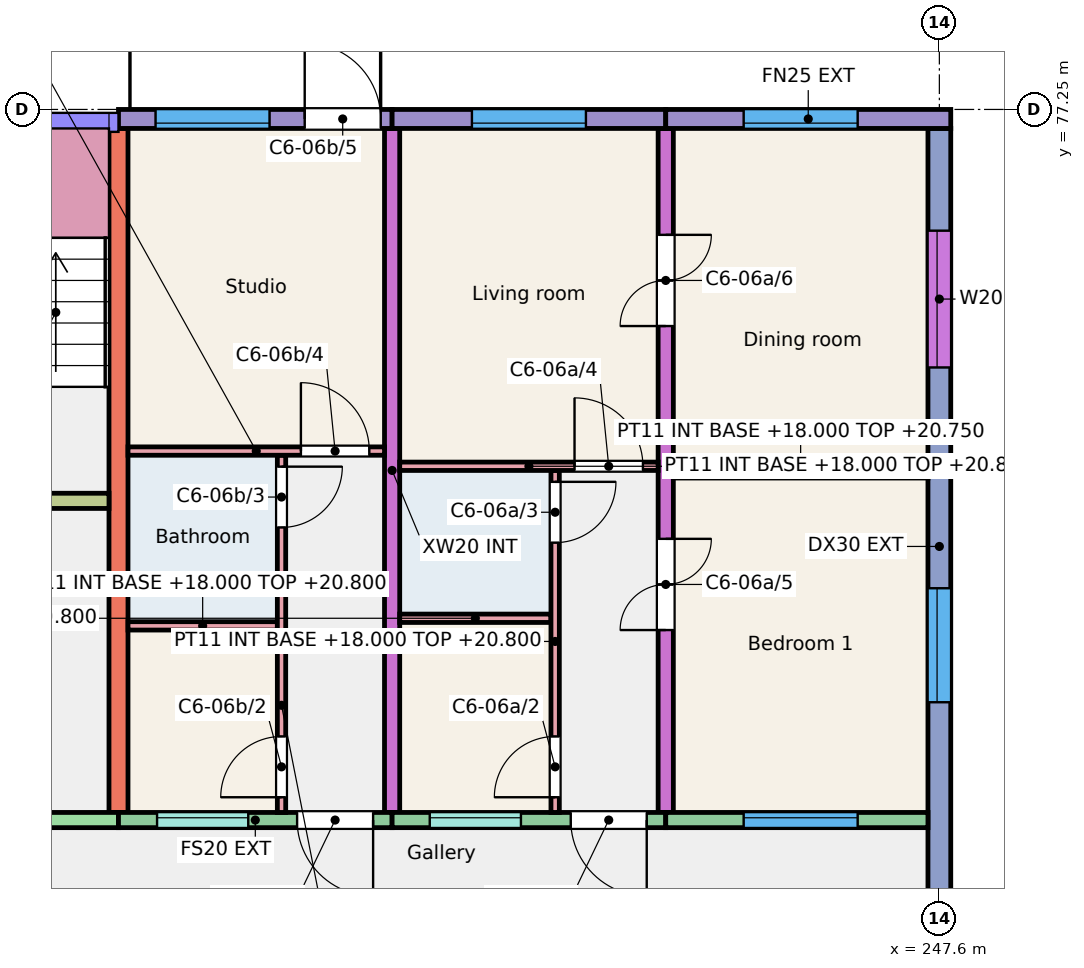
"""IFC4 building model, lengths in metres.
Left out: names, types, materials, properties, quantities, classifications, styles, units other than length and angle.
Written with IfcOpenShell. Run it as: python <this file> out.ifc"""

import sys

from ifc_helpers import new_model, si_unit, direction, frame, frame_2d, origin, place, context, subcontext, project, spatial, rectangle, extrude, element, fill, save


model = new_model("IFC4")
c1 = context("Model", 3, precision=1e-05, world=origin(), true_north=direction((0.0, 1.0)))
c2 = subcontext(c1, "Body", "Model", "MODEL_VIEW")
j1 = project(units=[si_unit("LENGTHUNIT", "METRE"), si_unit("PLANEANGLEUNIT", "RADIAN")], contexts=[c1])
p1 = place(None, origin())
s1 = spatial("IfcSite", under=j1, at=p1, CompositionType="ELEMENT")
p2 = place(p1, origin())
s2 = spatial("IfcBuilding", under=s1, at=p2, CompositionType="ELEMENT")
p3 = place(p2, frame((0.0, 0.0, 18.0)))
s3 = spatial("IfcBuildingStorey", under=s2, at=p3, CompositionType="ELEMENT", Elevation=18.0)
p4 = place(p3, frame((236.8, 68.0, 0.0), z_axis=(0.0, 0.0, 1.0), x_axis=(0.0, 1.0, 0.0)))
e1 = element("IfcWall", 1, at=p4, inside=s3, PredefinedType="SHEAR", context=c2, shape_type="SweptSolid", body=[
    extrude(rectangle(XDim=9.0, YDim=0.25, at=frame_2d((4.5, 0.0))), origin(), (0.0, 0.0, 1.0), 3.0),
])
p5 = place(p3, frame((240.4, 68.0, 0.0), z_axis=(0.0, 0.0, 1.0), x_axis=(0.0, 1.0, 0.0)))
e2 = element("IfcWall", 2, at=p5, inside=s3, PredefinedType="SHEAR", context=c2, shape_type="SweptSolid", body=[
    extrude(rectangle(XDim=9.0, YDim=0.2, at=frame_2d((4.5, 0.0))), origin(), (0.0, 0.0, 1.0), 3.0),
])
p6 = place(p3, frame((244.0, 68.0, 0.0), z_axis=(0.0, 0.0, 1.0), x_axis=(0.0, 1.0, 0.0)))
e3 = element("IfcWall", 3, at=p6, inside=s3, PredefinedType="SHEAR", context=c2, shape_type="SweptSolid", body=[
    extrude(rectangle(XDim=9.0, YDim=0.2, at=frame_2d((4.5, 0.0))), origin(), (0.0, 0.0, 1.0), 3.0),
])
p7 = place(p6, frame((2.4, 0.0, 0.0)))
e4 = element("IfcOpeningElement", 4, at=p7, cuts=e3, PredefinedType="OPENING", context=c2, shape_type="SweptSolid", body=[
    extrude(rectangle(XDim=1.2, YDim=2.1, at=frame_2d((0.6, 1.05))), frame((0.0, 0.11, 0.0), z_axis=(0.0, -1.0, 0.0), x_axis=(1.0, 0.0, 0.0)), (0.0, 0.0, 1.0), 0.22),
])
p8 = place(p6, frame((6.4, 0.0, 0.0)))
e5 = element("IfcOpeningElement", 5, at=p8, cuts=e3, PredefinedType="OPENING", context=c2, shape_type="SweptSolid", body=[
    extrude(rectangle(XDim=1.2, YDim=2.1, at=frame_2d((0.6, 1.05))), frame((0.0, 0.11, 0.0), z_axis=(0.0, -1.0, 0.0), x_axis=(1.0, 0.0, 0.0)), (0.0, 0.0, 1.0), 0.22),
])
p9 = place(p3, frame((247.6, 66.0, 0.0), z_axis=(0.0, 0.0, 1.0), x_axis=(0.0, 1.0, 0.0)))
e6 = element("IfcWall", 6, at=p9, inside=s3, PredefinedType="SHEAR", context=c2, shape_type="SweptSolid", body=[
    extrude(rectangle(XDim=11.0, YDim=0.3, at=frame_2d((5.5, 0.0))), origin(), (0.0, 0.0, 1.0), 3.0),
])
p10 = place(p9, frame((3.45, 0.0, 0.9)))
e7 = element("IfcOpeningElement", 7, at=p10, cuts=e6, PredefinedType="OPENING", context=c2, shape_type="SweptSolid", body=[
    extrude(rectangle(XDim=1.5, YDim=1.5, at=frame_2d((0.75, 0.75))), frame((0.0, 0.16, 0.0), z_axis=(0.0, -1.0, 0.0), x_axis=(1.0, 0.0, 0.0)), (0.0, 0.0, 1.0), 0.32),
])
p11 = place(p9, frame((7.855, 0.0, 0.9)))
e8 = element("IfcOpeningElement", 8, at=p11, cuts=e6, PredefinedType="OPENING", context=c2, shape_type="SweptSolid", body=[
    extrude(rectangle(XDim=1.8, YDim=1.5, at=frame_2d((0.9, 0.75))), frame((0.0, 0.16, 0.0), z_axis=(0.0, -1.0, 0.0), x_axis=(1.0, 0.0, 0.0)), (0.0, 0.0, 1.0), 0.32),
])
p12 = place(p3, frame((230.95, 67.9, 0.0), z_axis=(0.0, 0.0, 1.0), x_axis=(1.0, 0.0, 0.0)))
e9 = element("IfcWall", 9, at=p12, inside=s3, PredefinedType="SHEAR", context=c2, shape_type="SweptSolid", body=[
    extrude(rectangle(XDim=5.85, YDim=0.2, at=frame_2d((2.925, 0.0))), origin(), (0.0, 0.0, 1.0), 3.0),
])
p13 = place(p12, frame((2.312, 0.0, 0.0)))
e10 = element("IfcOpeningElement", 10, at=p13, cuts=e9, PredefinedType="OPENING", context=c2, shape_type="SweptSolid", body=[
    extrude(rectangle(XDim=1.1, YDim=2.1, at=frame_2d((0.55, 1.05))), frame((0.0, 0.11, 0.0), z_axis=(0.0, -1.0, 0.0), x_axis=(1.0, 0.0, 0.0)), (0.0, 0.0, 1.0), 0.22),
])
p14 = place(p3, frame((230.95, 72.1, 0.0), z_axis=(0.0, 0.0, 1.0), x_axis=(1.0, 0.0, 0.0)))
e11 = element("IfcWall", 11, at=p14, inside=s3, PredefinedType="SHEAR", context=c2, shape_type="SweptSolid", body=[
    extrude(rectangle(XDim=5.725, YDim=0.2, at=frame_2d((2.863, 0.0))), origin(), (0.0, 0.0, 1.0), 3.0),
])
p15 = place(p14, frame((3.775, 0.0, 0.0)))
e12 = element("IfcOpeningElement", 12, at=p15, cuts=e11, PredefinedType="OPENING", context=c2, shape_type="SweptSolid", body=[
    extrude(rectangle(XDim=1.0, YDim=2.1, at=frame_2d((0.5, 1.05))), frame((0.0, 0.11, 0.0), z_axis=(0.0, -1.0, 0.0), x_axis=(1.0, 0.0, 0.0)), (0.0, 0.0, 1.0), 0.22),
])
p16 = place(p14, frame((0.762, 0.0, 0.0)))
e13 = element("IfcOpeningElement", 13, at=p16, cuts=e11, PredefinedType="OPENING", context=c2, shape_type="SweptSolid", body=[
    extrude(rectangle(XDim=1.1, YDim=2.1, at=frame_2d((0.55, 1.05))), frame((0.0, 0.11, 0.0), z_axis=(0.0, -1.0, 0.0), x_axis=(1.0, 0.0, 0.0)), (0.0, 0.0, 1.0), 0.22),
])
p17 = place(p3, frame((236.8, 77.125, 0.0), z_axis=(0.0, 0.0, 1.0), x_axis=(1.0, 0.0, 0.0)))
e14 = element("IfcWall", 14, at=p17, inside=s3, PredefinedType="SOLIDWALL", context=c2, shape_type="SweptSolid", body=[
    extrude(rectangle(XDim=3.6, YDim=0.25, at=frame_2d((1.8, 0.0))), origin(), (0.0, 0.0, 1.0), 3.0),
])
p18 = place(p17, frame((0.488, 0.0, 0.9)))
e15 = element("IfcOpeningElement", 15, at=p18, cuts=e14, PredefinedType="OPENING", context=c2, shape_type="SweptSolid", body=[
    extrude(rectangle(XDim=1.5, YDim=1.5, at=frame_2d((0.75, 0.75))), frame((0.0, 0.135, 0.0), z_axis=(0.0, -1.0, 0.0), x_axis=(1.0, 0.0, 0.0)), (0.0, 0.0, 1.0), 0.27),
])
p19 = place(p17, frame((2.45, 0.0, 0.0)))
e16 = element("IfcOpeningElement", 16, at=p19, cuts=e14, PredefinedType="OPENING", context=c2, shape_type="SweptSolid", body=[
    extrude(rectangle(XDim=1.0, YDim=2.1, at=frame_2d((0.5, 1.05))), frame((0.0, 0.135, 0.0), z_axis=(0.0, -1.0, 0.0), x_axis=(1.0, 0.0, 0.0)), (0.0, 0.0, 1.0), 0.27),
])
p20 = place(p3, frame((236.8, 67.9, 0.0), z_axis=(0.0, 0.0, 1.0), x_axis=(1.0, 0.0, 0.0)))
e17 = element("IfcWall", 17, at=p20, inside=s3, PredefinedType="SOLIDWALL", context=c2, shape_type="SweptSolid", body=[
    extrude(rectangle(XDim=3.6, YDim=0.2, at=frame_2d((1.8, 0.0))), origin(), (0.0, 0.0, 1.0), 3.0),
])
p21 = place(p20, frame((0.508, 0.0, 1.1)))
e18 = element("IfcOpeningElement", 18, at=p21, cuts=e17, PredefinedType="OPENING", context=c2, shape_type="SweptSolid", body=[
    extrude(rectangle(XDim=1.2, YDim=1.3, at=frame_2d((0.6, 0.65))), frame((0.0, 0.11, 0.0), z_axis=(0.0, -1.0, 0.0), x_axis=(1.0, 0.0, 0.0)), (0.0, 0.0, 1.0), 0.22),
])
p22 = place(p20, frame((2.35, 0.0, 0.0)))
e19 = element("IfcOpeningElement", 19, at=p22, cuts=e17, PredefinedType="OPENING", context=c2, shape_type="SweptSolid", body=[
    extrude(rectangle(XDim=1.0, YDim=2.1, at=frame_2d((0.5, 1.05))), frame((0.0, 0.11, 0.0), z_axis=(0.0, -1.0, 0.0), x_axis=(1.0, 0.0, 0.0)), (0.0, 0.0, 1.0), 0.22),
])
p23 = place(p3, frame((240.4, 77.125, 0.0), z_axis=(0.0, 0.0, 1.0), x_axis=(1.0, 0.0, 0.0)))
e20 = element("IfcWall", 20, at=p23, inside=s3, PredefinedType="SOLIDWALL", context=c2, shape_type="SweptSolid", body=[
    extrude(rectangle(XDim=3.6, YDim=0.25, at=frame_2d((1.8, 0.0))), origin(), (0.0, 0.0, 1.0), 3.0),
])
p24 = place(p23, frame((1.05, 0.0, 0.9)))
e21 = element("IfcOpeningElement", 21, at=p24, cuts=e20, PredefinedType="OPENING", context=c2, shape_type="SweptSolid", body=[
    extrude(rectangle(XDim=1.5, YDim=1.5, at=frame_2d((0.75, 0.75))), frame((0.0, 0.135, 0.0), z_axis=(0.0, -1.0, 0.0), x_axis=(1.0, 0.0, 0.0)), (0.0, 0.0, 1.0), 0.27),
])
p25 = place(p3, frame((240.4, 67.9, 0.0), z_axis=(0.0, 0.0, 1.0), x_axis=(1.0, 0.0, 0.0)))
e22 = element("IfcWall", 22, at=p25, inside=s3, PredefinedType="SOLIDWALL", context=c2, shape_type="SweptSolid", body=[
    extrude(rectangle(XDim=3.6, YDim=0.2, at=frame_2d((1.8, 0.0))), origin(), (0.0, 0.0, 1.0), 3.0),
])
p26 = place(p25, frame((0.495, 0.0, 1.1)))
e23 = element("IfcOpeningElement", 23, at=p26, cuts=e22, PredefinedType="OPENING", context=c2, shape_type="SweptSolid", body=[
    extrude(rectangle(XDim=1.2, YDim=1.3, at=frame_2d((0.6, 0.65))), frame((0.0, 0.11, 0.0), z_axis=(0.0, -1.0, 0.0), x_axis=(1.0, 0.0, 0.0)), (0.0, 0.0, 1.0), 0.22),
])
p27 = place(p25, frame((2.35, 0.0, 0.0)))
e24 = element("IfcOpeningElement", 24, at=p27, cuts=e22, PredefinedType="OPENING", context=c2, shape_type="SweptSolid", body=[
    extrude(rectangle(XDim=1.0, YDim=2.1, at=frame_2d((0.5, 1.05))), frame((0.0, 0.11, 0.0), z_axis=(0.0, -1.0, 0.0), x_axis=(1.0, 0.0, 0.0)), (0.0, 0.0, 1.0), 0.22),
])
p28 = place(p3, frame((244.0, 77.125, 0.0), z_axis=(0.0, 0.0, 1.0), x_axis=(1.0, 0.0, 0.0)))
e25 = element("IfcWall", 25, at=p28, inside=s3, PredefinedType="SOLIDWALL", context=c2, shape_type="SweptSolid", body=[
    extrude(rectangle(XDim=3.75, YDim=0.25, at=frame_2d((1.875, 0.0))), origin(), (0.0, 0.0, 1.0), 3.0),
])
p29 = place(p28, frame((1.025, 0.0, 0.9)))
e26 = element("IfcOpeningElement", 26, at=p29, cuts=e25, PredefinedType="OPENING", context=c2, shape_type="SweptSolid", body=[
    extrude(rectangle(XDim=1.5, YDim=1.5, at=frame_2d((0.75, 0.75))), frame((0.0, 0.135, 0.0), z_axis=(0.0, -1.0, 0.0), x_axis=(1.0, 0.0, 0.0)), (0.0, 0.0, 1.0), 0.27),
])
p30 = place(p3, frame((244.0, 67.9, 0.0), z_axis=(0.0, 0.0, 1.0), x_axis=(1.0, 0.0, 0.0)))
e27 = element("IfcWall", 27, at=p30, inside=s3, PredefinedType="SOLIDWALL", context=c2, shape_type="SweptSolid", body=[
    extrude(rectangle(XDim=3.45, YDim=0.2, at=frame_2d((1.725, 0.0))), origin(), (0.0, 0.0, 1.0), 3.0),
])
p31 = place(p30, frame((1.025, 0.0, 0.9)))
e28 = element("IfcOpeningElement", 28, at=p31, cuts=e27, PredefinedType="OPENING", context=c2, shape_type="SweptSolid", body=[
    extrude(rectangle(XDim=1.5, YDim=1.5, at=frame_2d((0.75, 0.75))), frame((0.0, 0.11, 0.0), z_axis=(0.0, -1.0, 0.0), x_axis=(1.0, 0.0, 0.0)), (0.0, 0.0, 1.0), 0.22),
])
p32 = place(p3, frame((240.5, 70.555, 0.0), z_axis=(0.0, 0.0, 1.0), x_axis=(1.0, 0.0, 0.0)))
e29 = element("IfcWall", 29, at=p32, inside=s3, PredefinedType="PARTITIONING", context=c2, shape_type="SweptSolid", body=[
    extrude(rectangle(XDim=1.99, YDim=0.11, at=frame_2d((0.995, 0.0))), origin(), (0.0, 0.0, 1.0), 2.8),
])
p33 = place(p3, frame((242.545, 68.0, 0.0), z_axis=(0.0, 0.0, 1.0), x_axis=(0.0, 1.0, 0.0)))
e30 = element("IfcWall", 30, at=p33, inside=s3, PredefinedType="PARTITIONING", context=c2, shape_type="SweptSolid", body=[
    extrude(rectangle(XDim=4.5, YDim=0.11, at=frame_2d((2.25, 0.0))), origin(), (0.0, 0.0, 1.0), 2.8),
])
p34 = place(p33, frame((0.2, 0.0, 0.0)))
e31 = element("IfcOpeningElement", 31, at=p34, cuts=e30, PredefinedType="OPENING", context=c2, shape_type="SweptSolid", body=[
    extrude(rectangle(XDim=0.8, YDim=2.1, at=frame_2d((0.4, 1.05))), frame((0.0, 0.065, 0.0), z_axis=(0.0, -1.0, 0.0), x_axis=(1.0, 0.0, 0.0)), (0.0, 0.0, 1.0), 0.13),
])
p35 = place(p33, frame((3.55, 0.0, 0.0)))
e32 = element("IfcOpeningElement", 32, at=p35, cuts=e30, PredefinedType="OPENING", context=c2, shape_type="SweptSolid", body=[
    extrude(rectangle(XDim=0.8, YDim=2.1, at=frame_2d((0.4, 1.05))), frame((0.0, 0.065, 0.0), z_axis=(0.0, -1.0, 0.0), x_axis=(1.0, 0.0, 0.0)), (0.0, 0.0, 1.0), 0.13),
])
p36 = place(p3, frame((240.5, 72.555, 0.0), z_axis=(0.0, 0.0, 1.0), x_axis=(1.0, 0.0, 0.0)))
e33 = element("IfcWall", 33, at=p36, inside=s3, PredefinedType="PARTITIONING", context=c2, shape_type="SweptSolid", body=[
    extrude(rectangle(XDim=3.4, YDim=0.11, at=frame_2d((1.7, 0.0))), origin(), (0.0, 0.0, 1.0), 2.8),
])
p37 = place(p36, frame((2.3, 0.0, 0.0)))
e34 = element("IfcOpeningElement", 34, at=p37, cuts=e33, PredefinedType="OPENING", context=c2, shape_type="SweptSolid", body=[
    extrude(rectangle(XDim=0.9, YDim=2.1, at=frame_2d((0.45, 1.05))), frame((0.0, 0.065, 0.0), z_axis=(0.0, -1.0, 0.0), x_axis=(1.0, 0.0, 0.0)), (0.0, 0.0, 1.0), 0.13),
])
p38 = place(p3, frame((244.1, 72.455, 0.0), z_axis=(0.0, 0.0, 1.0), x_axis=(1.0, 0.0, 0.0)))
e35 = element("IfcWall", 35, at=p38, inside=s3, PredefinedType="PARTITIONING", context=c2, shape_type="SweptSolid", body=[
    extrude(rectangle(XDim=3.35, YDim=0.11, at=frame_2d((1.675, 0.0))), origin(), (0.0, 0.0, 1.0), 2.75),
])
p39 = place(p3, frame((236.925, 70.455, 0.0), z_axis=(0.0, 0.0, 1.0), x_axis=(1.0, 0.0, 0.0)))
e36 = element("IfcWall", 36, at=p39, inside=s3, PredefinedType="PARTITIONING", context=c2, shape_type="SweptSolid", body=[
    extrude(rectangle(XDim=1.965, YDim=0.11, at=frame_2d((0.982, 0.0))), origin(), (0.0, 0.0, 1.0), 2.8),
])
p40 = place(p3, frame((238.945, 68.0, 0.0), z_axis=(0.0, 0.0, 1.0), x_axis=(0.0, 1.0, 0.0)))
e37 = element("IfcWall", 37, at=p40, inside=s3, PredefinedType="PARTITIONING", context=c2, shape_type="SweptSolid", body=[
    extrude(rectangle(XDim=4.7, YDim=0.11, at=frame_2d((2.35, 0.0))), origin(), (0.0, 0.0, 1.0), 2.8),
])
p41 = place(p40, frame((0.2, 0.0, 0.0)))
e38 = element("IfcOpeningElement", 38, at=p41, cuts=e37, PredefinedType="OPENING", context=c2, shape_type="SweptSolid", body=[
    extrude(rectangle(XDim=0.8, YDim=2.1, at=frame_2d((0.4, 1.05))), frame((0.0, 0.065, 0.0), z_axis=(0.0, -1.0, 0.0), x_axis=(1.0, 0.0, 0.0)), (0.0, 0.0, 1.0), 0.13),
])
p42 = place(p40, frame((3.75, 0.0, 0.0)))
e39 = element("IfcOpeningElement", 39, at=p42, cuts=e37, PredefinedType="OPENING", context=c2, shape_type="SweptSolid", body=[
    extrude(rectangle(XDim=0.8, YDim=2.1, at=frame_2d((0.4, 1.05))), frame((0.0, 0.065, 0.0), z_axis=(0.0, -1.0, 0.0), x_axis=(1.0, 0.0, 0.0)), (0.0, 0.0, 1.0), 0.13),
])
p43 = place(p3, frame((236.925, 72.755, 0.0), z_axis=(0.0, 0.0, 1.0), x_axis=(1.0, 0.0, 0.0)))
e40 = element("IfcWall", 40, at=p43, inside=s3, PredefinedType="PARTITIONING", context=c2, shape_type="SweptSolid", body=[
    extrude(rectangle(XDim=3.375, YDim=0.11, at=frame_2d((1.688, 0.0))), origin(), (0.0, 0.0, 1.0), 2.8),
])
p44 = place(p43, frame((2.275, 0.0, 0.0)))
e41 = element("IfcOpeningElement", 41, at=p44, cuts=e40, PredefinedType="OPENING", context=c2, shape_type="SweptSolid", body=[
    extrude(rectangle(XDim=0.9, YDim=2.1, at=frame_2d((0.45, 1.05))), frame((0.0, 0.065, 0.0), z_axis=(0.0, -1.0, 0.0), x_axis=(1.0, 0.0, 0.0)), (0.0, 0.0, 1.0), 0.13),
])
p45 = place(p31, origin())
e42 = element("IfcWindow", 42, at=p45, inside=s3, PartitioningType="SINGLE_PANEL", PredefinedType="WINDOW", context=c2, shape_type="SweptSolid", body=[
    extrude(rectangle(XDim=1.5, YDim=1.5, at=frame_2d((0.75, 0.75))), frame((0.0, 0.06, 0.0), z_axis=(0.0, -1.0, 0.0), x_axis=(1.0, 0.0, 0.0)), (0.0, 0.0, 1.0), 0.06),
])
fill(e28, e42)
p46 = place(p29, origin())
e43 = element("IfcWindow", 43, at=p46, inside=s3, PartitioningType="SINGLE_PANEL", PredefinedType="WINDOW", context=c2, shape_type="SweptSolid", body=[
    extrude(rectangle(XDim=1.5, YDim=1.5, at=frame_2d((0.75, 0.75))), frame((0.0, -0.025, 0.0), z_axis=(0.0, -1.0, 0.0), x_axis=(1.0, 0.0, 0.0)), (0.0, 0.0, 1.0), 0.06),
])
fill(e26, e43)
p47 = place(p26, origin())
e44 = element("IfcWindow", 44, at=p47, inside=s3, PartitioningType="SINGLE_PANEL", PredefinedType="WINDOW", context=c2, shape_type="SweptSolid", body=[
    extrude(rectangle(XDim=1.2, YDim=1.3, at=frame_2d((0.6, 0.65))), frame((0.0, 0.06, 0.0), z_axis=(0.0, -1.0, 0.0), x_axis=(1.0, 0.0, 0.0)), (0.0, 0.0, 1.0), 0.06),
])
fill(e23, e44)
p48 = place(p24, origin())
e45 = element("IfcWindow", 45, at=p48, inside=s3, PartitioningType="SINGLE_PANEL", PredefinedType="WINDOW", context=c2, shape_type="SweptSolid", body=[
    extrude(rectangle(XDim=1.5, YDim=1.5, at=frame_2d((0.75, 0.75))), frame((0.0, -0.025, 0.0), z_axis=(0.0, -1.0, 0.0), x_axis=(1.0, 0.0, 0.0)), (0.0, 0.0, 1.0), 0.06),
])
fill(e21, e45)
p49 = place(p10, origin())
e46 = element("IfcWindow", 46, at=p49, inside=s3, PartitioningType="SINGLE_PANEL", PredefinedType="WINDOW", context=c2, shape_type="SweptSolid", body=[
    extrude(rectangle(XDim=1.5, YDim=1.5, at=frame_2d((0.75, 0.75))), frame((0.0, 0.06, 0.0), z_axis=(0.0, -1.0, 0.0), x_axis=(1.0, 0.0, 0.0)), (0.0, 0.0, 1.0), 0.06),
])
fill(e7, e46)
p50 = place(p11, origin())
e47 = element("IfcWindow", 47, at=p50, inside=s3, PartitioningType="SINGLE_PANEL", PredefinedType="WINDOW", context=c2, shape_type="SweptSolid", body=[
    extrude(rectangle(XDim=1.8, YDim=1.5, at=frame_2d((0.9, 0.75))), frame((0.0, 0.06, 0.0), z_axis=(0.0, -1.0, 0.0), x_axis=(1.0, 0.0, 0.0)), (0.0, 0.0, 1.0), 0.06),
])
fill(e8, e47)
p51 = place(p21, origin())
e48 = element("IfcWindow", 48, at=p51, inside=s3, PartitioningType="SINGLE_PANEL", PredefinedType="WINDOW", context=c2, shape_type="SweptSolid", body=[
    extrude(rectangle(XDim=1.2, YDim=1.3, at=frame_2d((0.6, 0.65))), frame((0.0, 0.06, 0.0), z_axis=(0.0, -1.0, 0.0), x_axis=(1.0, 0.0, 0.0)), (0.0, 0.0, 1.0), 0.06),
])
fill(e18, e48)
p52 = place(p18, origin())
e49 = element("IfcWindow", 49, at=p52, inside=s3, PartitioningType="SINGLE_PANEL", PredefinedType="WINDOW", context=c2, shape_type="SweptSolid", body=[
    extrude(rectangle(XDim=1.5, YDim=1.5, at=frame_2d((0.75, 0.75))), frame((0.0, -0.025, 0.0), z_axis=(0.0, -1.0, 0.0), x_axis=(1.0, 0.0, 0.0)), (0.0, 0.0, 1.0), 0.06),
])
fill(e15, e49)
p53 = place(p27, origin())
e50 = element("IfcDoor", 50, at=p53, inside=s3, OperationType="SINGLE_SWING_RIGHT", PredefinedType="DOOR", context=c2, shape_type="SweptSolid", body=[
    extrude(rectangle(XDim=1.0, YDim=2.1, at=frame_2d((0.5, 1.05))), frame((0.0, 0.025, 0.0), z_axis=(0.0, -1.0, 0.0), x_axis=(1.0, 0.0, 0.0)), (0.0, 0.0, 1.0), 0.05),
])
fill(e24, e50)
p54 = place(p34, origin())
e51 = element("IfcDoor", 51, at=p54, inside=s3, OperationType="SINGLE_SWING_LEFT", PredefinedType="DOOR", context=c2, shape_type="SweptSolid", body=[
    extrude(rectangle(XDim=0.8, YDim=2.1, at=frame_2d((0.4, 1.05))), frame((0.0, 0.025, 0.0), z_axis=(0.0, -1.0, 0.0), x_axis=(1.0, 0.0, 0.0)), (0.0, 0.0, 1.0), 0.05),
])
fill(e31, e51)
p55 = place(p35, origin())
e52 = element("IfcDoor", 52, at=p55, inside=s3, OperationType="SINGLE_SWING_RIGHT", PredefinedType="DOOR", context=c2, shape_type="SweptSolid", body=[
    extrude(rectangle(XDim=0.8, YDim=2.1, at=frame_2d((0.4, 1.05))), frame((0.0, 0.025, 0.0), z_axis=(0.0, -1.0, 0.0), x_axis=(1.0, 0.0, 0.0)), (0.0, 0.0, 1.0), 0.05),
])
fill(e32, e52)
p56 = place(p37, origin())
e53 = element("IfcDoor", 53, at=p56, inside=s3, OperationType="SINGLE_SWING_LEFT", PredefinedType="DOOR", context=c2, shape_type="SweptSolid", body=[
    extrude(rectangle(XDim=0.9, YDim=2.1, at=frame_2d((0.45, 1.05))), frame((0.0, 0.025, 0.0), z_axis=(0.0, -1.0, 0.0), x_axis=(1.0, 0.0, 0.0)), (0.0, 0.0, 1.0), 0.05),
])
fill(e34, e53)
p57 = place(p7, origin())
e54 = element("IfcDoor", 54, at=p57, inside=s3, OperationType="DOUBLE_DOOR_SINGLE_SWING", PredefinedType="DOOR", context=c2, shape_type="SweptSolid", body=[
    extrude(rectangle(XDim=1.2, YDim=2.1, at=frame_2d((0.6, 1.05))), frame((0.0, 0.025, 0.0), z_axis=(0.0, -1.0, 0.0), x_axis=(1.0, 0.0, 0.0)), (0.0, 0.0, 1.0), 0.05),
])
fill(e4, e54)
p58 = place(p8, origin())
e55 = element("IfcDoor", 55, at=p58, inside=s3, OperationType="DOUBLE_DOOR_SINGLE_SWING", PredefinedType="DOOR", context=c2, shape_type="SweptSolid", body=[
    extrude(rectangle(XDim=1.2, YDim=2.1, at=frame_2d((0.6, 1.05))), frame((0.0, 0.025, 0.0), z_axis=(0.0, -1.0, 0.0), x_axis=(1.0, 0.0, 0.0)), (0.0, 0.0, 1.0), 0.05),
])
fill(e5, e55)
p59 = place(p22, origin())
e56 = element("IfcDoor", 56, at=p59, inside=s3, OperationType="SINGLE_SWING_RIGHT", PredefinedType="DOOR", context=c2, shape_type="SweptSolid", body=[
    extrude(rectangle(XDim=1.0, YDim=2.1, at=frame_2d((0.5, 1.05))), frame((0.0, 0.025, 0.0), z_axis=(0.0, -1.0, 0.0), x_axis=(1.0, 0.0, 0.0)), (0.0, 0.0, 1.0), 0.05),
])
fill(e19, e56)
p60 = place(p41, origin())
e57 = element("IfcDoor", 57, at=p60, inside=s3, OperationType="SINGLE_SWING_LEFT", PredefinedType="DOOR", context=c2, shape_type="SweptSolid", body=[
    extrude(rectangle(XDim=0.8, YDim=2.1, at=frame_2d((0.4, 1.05))), frame((0.0, 0.025, 0.0), z_axis=(0.0, -1.0, 0.0), x_axis=(1.0, 0.0, 0.0)), (0.0, 0.0, 1.0), 0.05),
])
fill(e38, e57)
p61 = place(p42, origin())
e58 = element("IfcDoor", 58, at=p61, inside=s3, OperationType="SINGLE_SWING_RIGHT", PredefinedType="DOOR", context=c2, shape_type="SweptSolid", body=[
    extrude(rectangle(XDim=0.8, YDim=2.1, at=frame_2d((0.4, 1.05))), frame((0.0, 0.025, 0.0), z_axis=(0.0, -1.0, 0.0), x_axis=(1.0, 0.0, 0.0)), (0.0, 0.0, 1.0), 0.05),
])
fill(e39, e58)
p62 = place(p44, origin())
e59 = element("IfcDoor", 59, at=p62, inside=s3, OperationType="SINGLE_SWING_LEFT", PredefinedType="DOOR", context=c2, shape_type="SweptSolid", body=[
    extrude(rectangle(XDim=0.9, YDim=2.1, at=frame_2d((0.45, 1.05))), frame((0.0, 0.025, 0.0), z_axis=(0.0, -1.0, 0.0), x_axis=(1.0, 0.0, 0.0)), (0.0, 0.0, 1.0), 0.05),
])
fill(e41, e59)
p63 = place(p19, origin())
e60 = element("IfcDoor", 60, at=p63, inside=s3, OperationType="SINGLE_SWING_LEFT", PredefinedType="DOOR", context=c2, shape_type="SweptSolid", body=[
    extrude(rectangle(XDim=1.0, YDim=2.1, at=frame_2d((0.5, 1.05))), frame((0.0, 0.025, 0.0), z_axis=(0.0, -1.0, 0.0), x_axis=(1.0, 0.0, 0.0)), (0.0, 0.0, 1.0), 0.05),
])
fill(e16, e60)
save(model, sys.argv[1])
